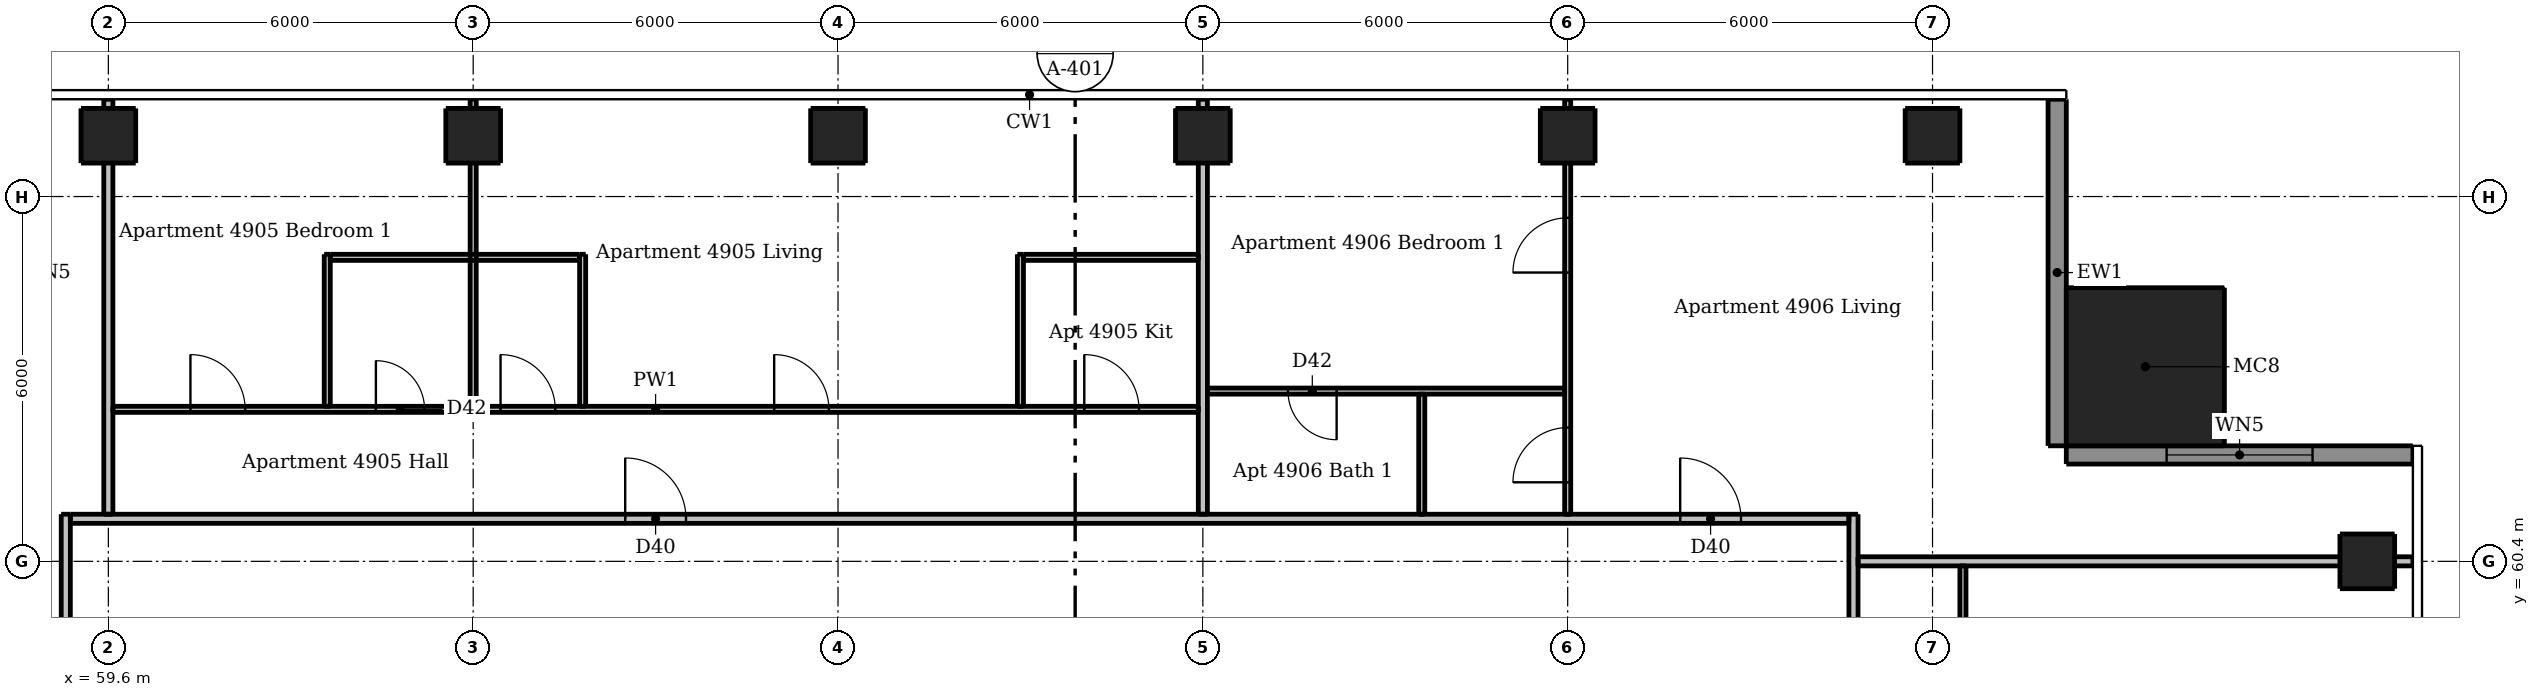
"""IFC4 building model, lengths in metres.
Left out: names, types, materials, properties, quantities, classifications, styles, units other than length and angle.
Written with IfcOpenShell. Run it as: python <this file> out.ifc"""

import sys

from ifc_helpers import new_model, si_unit, direction, frame, frame_2d, origin, origin_2d, place, context, subcontext, project, spatial, rectangle, extrude, element, fill, save


model = new_model("IFC4")
c1 = context("Model", 3, precision=1e-05, world=origin(), true_north=direction((0.0, 1.0)))
c2 = subcontext(c1, "Body", "Model", "MODEL_VIEW")
j1 = project(units=[si_unit("LENGTHUNIT", "METRE"), si_unit("PLANEANGLEUNIT", "RADIAN")], contexts=[c1])
p1 = place(None, origin())
s1 = spatial("IfcSite", under=j1, at=p1, CompositionType="ELEMENT")
p2 = place(p1, origin())
s2 = spatial("IfcBuilding", under=s1, at=p2, CompositionType="ELEMENT")
p3 = place(p2, frame((0.0, 0.0, 187.0)))
s3 = spatial("IfcBuildingStorey", under=s2, at=p3, CompositionType="ELEMENT", Elevation=187.0)
for number, where, z_axis, x_axis in (
    (1, (96.75, 60.4, 0.0), (0.0, 0.0, 1.0), (1.0, 0.0, 0.0)),
    (2, (59.6, 67.4, 0.0), (0.0, 0.0, 1.0), (1.0, 0.0, 0.0)),
    (3, (65.6, 67.4, 0.0), (0.0, 0.0, 1.0), (1.0, 0.0, 0.0)),
    (4, (71.6, 67.4, 0.0), (0.0, 0.0, 1.0), (1.0, 0.0, 0.0)),
    (5, (77.6, 67.4, 0.0), (0.0, 0.0, 1.0), (1.0, 0.0, 0.0)),
    (6, (83.6, 67.4, 0.0), (0.0, 0.0, 1.0), (1.0, 0.0, 0.0)),
    (7, (89.6, 67.4, 0.0), (0.0, 0.0, 1.0), (1.0, 0.0, 0.0)),
):
    element("IfcColumn", number, at=place(p3, frame(where, z_axis=z_axis, x_axis=x_axis)), inside=s3, PredefinedType="COLUMN", context=c2, shape_type="SweptSolid", body=[
        extrude(rectangle(XDim=0.9, YDim=0.9, at=origin_2d()), origin(), (0.0, 0.0, 1.0), 3.05),
    ])
p4 = place(p3, frame((93.1, 63.6, 0.0), z_axis=(0.0, 0.0, 1.0), x_axis=(1.0, 0.0, 0.0)))
e8 = element("IfcColumn", 8, at=p4, inside=s3, PredefinedType="COLUMN", context=c2, shape_type="SweptSolid", body=[
    extrude(rectangle(XDim=2.6, YDim=2.6, at=origin_2d()), origin(), (0.0, 0.0, 1.0), 3.3),
])
p5 = place(p3, frame((97.5, 62.15, 0.0), z_axis=(0.0, 0.0, 1.0), x_axis=(-1.0, 0.0, 0.0)))
e9 = element("IfcWall", 9, at=p5, inside=s3, PredefinedType="SOLIDWALL", context=c2, shape_type="SweptSolid", body=[
    extrude(rectangle(XDim=5.7, YDim=0.3, at=frame_2d((2.85, 0.0))), origin(), (0.0, 0.0, 1.0), 3.05),
])
p6 = place(p5, frame((1.65, 0.0, 0.15)))
e10 = element("IfcOpeningElement", 10, at=p6, cuts=e9, PredefinedType="OPENING", context=c2, shape_type="SweptSolid", body=[
    extrude(rectangle(XDim=2.4, YDim=2.1, at=frame_2d((1.2, 1.05))), frame((0.0, 0.16, 0.0), z_axis=(0.0, -1.0, 0.0), x_axis=(1.0, 0.0, 0.0)), (0.0, 0.0, 1.0), 0.32),
])
p7 = place(p3, frame((91.65, 62.3, 0.0), z_axis=(0.0, 0.0, 1.0), x_axis=(0.0, 1.0, 0.0)))
e11 = element("IfcWall", 11, at=p7, inside=s3, PredefinedType="SOLIDWALL", context=c2, shape_type="SweptSolid", body=[
    extrude(rectangle(XDim=5.7, YDim=0.3, at=frame_2d((2.85, 0.0))), origin(), (0.0, 0.0, 1.0), 3.05),
])
p8 = place(p3, frame((63.2, 62.95, 0.0), z_axis=(0.0, 0.0, 1.0), x_axis=(0.0, 1.0, 0.0)))
e12 = element("IfcWall", 12, at=p8, inside=s3, PredefinedType="PARTITIONING", context=c2, shape_type="SweptSolid", body=[
    extrude(rectangle(XDim=2.5, YDim=0.1, at=frame_2d((1.25, 0.0))), origin(), (0.0, 0.0, 1.0), 3.05),
])
p9 = place(p3, frame((65.6, 62.95, 0.0), z_axis=(0.0, 0.0, 1.0), x_axis=(0.0, 1.0, 0.0)))
e13 = element("IfcWall", 13, at=p9, inside=s3, PredefinedType="PARTITIONING", context=c2, shape_type="SweptSolid", body=[
    extrude(rectangle(XDim=5.05, YDim=0.1, at=frame_2d((2.525, 0.0))), origin(), (0.0, 0.0, 1.0), 2.516),
])
for number, where, z_axis, x_axis in (
    (14, (67.4, 62.95, 0.0), (0.0, 0.0, 1.0), (0.0, 1.0, 0.0)),
    (15, (74.6, 62.95, 0.0), (0.0, 0.0, 1.0), (0.0, 1.0, 0.0)),
):
    element("IfcWall", number, at=place(p3, frame(where, z_axis=z_axis, x_axis=x_axis)), inside=s3, PredefinedType="PARTITIONING", context=c2, shape_type="SweptSolid", body=[
        extrude(rectangle(XDim=2.5, YDim=0.1, at=frame_2d((1.25, 0.0))), origin(), (0.0, 0.0, 1.0), 3.05),
    ])
p10 = place(p3, frame((81.2, 61.175, 0.0), z_axis=(0.0, 0.0, 1.0), x_axis=(0.0, 1.0, 0.0)))
e16 = element("IfcWall", 16, at=p10, inside=s3, PredefinedType="PARTITIONING", context=c2, shape_type="SweptSolid", body=[
    extrude(rectangle(XDim=1.975, YDim=0.1, at=frame_2d((0.987, 0.0))), origin(), (0.0, 0.0, 1.0), 3.05),
])
p11 = place(p3, frame((83.6, 61.175, 0.0), z_axis=(0.0, 0.0, 1.0), x_axis=(0.0, 1.0, 0.0)))
e17 = element("IfcWall", 17, at=p11, inside=s3, PredefinedType="PARTITIONING", context=c2, shape_type="SweptSolid", body=[
    extrude(rectangle(XDim=6.825, YDim=0.1, at=frame_2d((3.413, 0.0))), origin(), (0.0, 0.0, 1.0), 2.516),
])
p12 = place(p11, frame((0.525, 0.0, 0.0)))
e18 = element("IfcOpeningElement", 18, at=p12, cuts=e17, PredefinedType="OPENING", context=c2, shape_type="SweptSolid", body=[
    extrude(rectangle(XDim=0.9, YDim=2.1, at=frame_2d((0.45, 1.05))), frame((0.0, 0.06, 0.0), z_axis=(0.0, -1.0, 0.0), x_axis=(1.0, 0.0, 0.0)), (0.0, 0.0, 1.0), 0.12),
])
p13 = place(p11, frame((3.975, 0.0, 0.0)))
e19 = element("IfcOpeningElement", 19, at=p13, cuts=e17, PredefinedType="OPENING", context=c2, shape_type="SweptSolid", body=[
    extrude(rectangle(XDim=0.9, YDim=2.1, at=frame_2d((0.45, 1.05))), frame((0.0, 0.06, 0.0), z_axis=(0.0, -1.0, 0.0), x_axis=(1.0, 0.0, 0.0)), (0.0, 0.0, 1.0), 0.12),
])
p14 = place(p3, frame((90.1, 60.325, 0.0), z_axis=(0.0, 0.0, 1.0), x_axis=(0.0, -1.0, 0.0)))
e20 = element("IfcWall", 20, at=p14, inside=s3, PredefinedType="PARTITIONING", context=c2, shape_type="SweptSolid", body=[
    extrude(rectangle(XDim=20.75, YDim=0.1, at=frame_2d((10.375, 0.0))), origin(), (0.0, 0.0, 1.0), 3.05),
])
p15 = place(p14, frame((17.425, 0.0, 0.0)))
e21 = element("IfcOpeningElement", 21, at=p15, cuts=e20, PredefinedType="OPENING", context=c2, shape_type="SweptSolid", body=[
    extrude(rectangle(XDim=0.9, YDim=2.1, at=frame_2d((0.45, 1.05))), frame((0.0, 0.06, 0.0), z_axis=(0.0, -1.0, 0.0), x_axis=(1.0, 0.0, 0.0)), (0.0, 0.0, 1.0), 0.12),
])
p16 = place(p14, frame((12.975, 0.0, 0.0)))
e22 = element("IfcOpeningElement", 22, at=p16, cuts=e20, PredefinedType="OPENING", context=c2, shape_type="SweptSolid", body=[
    extrude(rectangle(XDim=0.9, YDim=2.1, at=frame_2d((0.45, 1.05))), frame((0.0, 0.06, 0.0), z_axis=(0.0, -1.0, 0.0), x_axis=(1.0, 0.0, 0.0)), (0.0, 0.0, 1.0), 0.12),
])
p17 = place(p14, frame((7.275, 0.0, 0.0)))
e23 = element("IfcOpeningElement", 23, at=p17, cuts=e20, PredefinedType="OPENING", context=c2, shape_type="SweptSolid", body=[
    extrude(rectangle(XDim=0.9, YDim=2.1, at=frame_2d((0.45, 1.05))), frame((0.0, 0.06, 0.0), z_axis=(0.0, -1.0, 0.0), x_axis=(1.0, 0.0, 0.0)), (0.0, 0.0, 1.0), 0.12),
])
p18 = place(p14, frame((1.275, 0.0, 0.0)))
e24 = element("IfcOpeningElement", 24, at=p18, cuts=e20, PredefinedType="OPENING", context=c2, shape_type="SweptSolid", body=[
    extrude(rectangle(XDim=0.9, YDim=2.1, at=frame_2d((0.45, 1.05))), frame((0.0, 0.06, 0.0), z_axis=(0.0, -1.0, 0.0), x_axis=(1.0, 0.0, 0.0)), (0.0, 0.0, 1.0), 0.12),
])
p19 = place(p14, frame((10.325, 0.0, 0.0)))
e25 = element("IfcOpeningElement", 25, at=p19, cuts=e20, PredefinedType="OPENING", context=c2, shape_type="SweptSolid", body=[
    extrude(rectangle(XDim=0.8, YDim=2.1, at=frame_2d((0.4, 1.05))), frame((0.0, 0.06, 0.0), z_axis=(0.0, -1.0, 0.0), x_axis=(1.0, 0.0, 0.0)), (0.0, 0.0, 1.0), 0.12),
])
p20 = place(p14, frame((4.325, 0.0, 0.0)))
e26 = element("IfcOpeningElement", 26, at=p20, cuts=e20, PredefinedType="OPENING", context=c2, shape_type="SweptSolid", body=[
    extrude(rectangle(XDim=0.8, YDim=2.1, at=frame_2d((0.4, 1.05))), frame((0.0, 0.06, 0.0), z_axis=(0.0, -1.0, 0.0), x_axis=(1.0, 0.0, 0.0)), (0.0, 0.0, 1.0), 0.12),
])
p21 = place(p3, frame((63.25, 65.4, 0.0), z_axis=(0.0, 0.0, 1.0), x_axis=(1.0, 0.0, 0.0)))
e27 = element("IfcWall", 27, at=p21, inside=s3, PredefinedType="PARTITIONING", context=c2, shape_type="SweptSolid", body=[
    extrude(rectangle(XDim=4.1, YDim=0.1, at=frame_2d((2.05, 0.0))), origin(), (0.0, 0.0, 1.0), 3.05),
])
p22 = place(p3, frame((74.65, 65.4, 0.0), z_axis=(0.0, 0.0, 1.0), x_axis=(1.0, 0.0, 0.0)))
e28 = element("IfcWall", 28, at=p22, inside=s3, PredefinedType="PARTITIONING", context=c2, shape_type="SweptSolid", body=[
    extrude(rectangle(XDim=2.875, YDim=0.1, at=frame_2d((1.438, 0.0))), origin(), (0.0, 0.0, 1.0), 3.05),
])
p23 = place(p3, frame((83.55, 63.2, 0.0), z_axis=(0.0, 0.0, 1.0), x_axis=(-1.0, 0.0, 0.0)))
e29 = element("IfcWall", 29, at=p23, inside=s3, PredefinedType="PARTITIONING", context=c2, shape_type="SweptSolid", body=[
    extrude(rectangle(XDim=5.875, YDim=0.1, at=frame_2d((2.938, 0.0))), origin(), (0.0, 0.0, 1.0), 3.05),
])
p24 = place(p23, frame((3.75, 0.0, 0.0)))
e30 = element("IfcOpeningElement", 30, at=p24, cuts=e29, PredefinedType="OPENING", context=c2, shape_type="SweptSolid", body=[
    extrude(rectangle(XDim=0.8, YDim=2.1, at=frame_2d((0.4, 1.05))), frame((0.0, 0.06, 0.0), z_axis=(0.0, -1.0, 0.0), x_axis=(1.0, 0.0, 0.0)), (0.0, 0.0, 1.0), 0.12),
])
p25 = place(p3, frame((59.675, 62.9, 0.0), z_axis=(0.0, 0.0, 1.0), x_axis=(1.0, 0.0, 0.0)))
e31 = element("IfcWall", 31, at=p25, inside=s3, PredefinedType="PARTITIONING", context=c2, shape_type="SweptSolid", body=[
    extrude(rectangle(XDim=17.85, YDim=0.1, at=frame_2d((8.925, 0.0))), origin(), (0.0, 0.0, 1.0), 3.05),
])
p26 = place(p25, frame((10.875, 0.0, 0.0)))
e32 = element("IfcOpeningElement", 32, at=p26, cuts=e31, PredefinedType="OPENING", context=c2, shape_type="SweptSolid", body=[
    extrude(rectangle(XDim=0.9, YDim=2.1, at=frame_2d((0.45, 1.05))), frame((0.0, 0.06, 0.0), z_axis=(0.0, -1.0, 0.0), x_axis=(1.0, 0.0, 0.0)), (0.0, 0.0, 1.0), 0.12),
])
p27 = place(p25, frame((15.975, 0.0, 0.0)))
e33 = element("IfcOpeningElement", 33, at=p27, cuts=e31, PredefinedType="OPENING", context=c2, shape_type="SweptSolid", body=[
    extrude(rectangle(XDim=0.9, YDim=2.1, at=frame_2d((0.45, 1.05))), frame((0.0, 0.06, 0.0), z_axis=(0.0, -1.0, 0.0), x_axis=(1.0, 0.0, 0.0)), (0.0, 0.0, 1.0), 0.12),
])
p28 = place(p25, frame((6.375, 0.0, 0.0)))
e34 = element("IfcOpeningElement", 34, at=p28, cuts=e31, PredefinedType="OPENING", context=c2, shape_type="SweptSolid", body=[
    extrude(rectangle(XDim=0.9, YDim=2.1, at=frame_2d((0.45, 1.05))), frame((0.0, 0.06, 0.0), z_axis=(0.0, -1.0, 0.0), x_axis=(1.0, 0.0, 0.0)), (0.0, 0.0, 1.0), 0.12),
])
p29 = place(p25, frame((1.275, 0.0, 0.0)))
e35 = element("IfcOpeningElement", 35, at=p29, cuts=e31, PredefinedType="OPENING", context=c2, shape_type="SweptSolid", body=[
    extrude(rectangle(XDim=0.9, YDim=2.1, at=frame_2d((0.45, 1.05))), frame((0.0, 0.06, 0.0), z_axis=(0.0, -1.0, 0.0), x_axis=(1.0, 0.0, 0.0)), (0.0, 0.0, 1.0), 0.12),
])
p30 = place(p25, frame((4.325, 0.0, 0.0)))
e36 = element("IfcOpeningElement", 36, at=p30, cuts=e31, PredefinedType="OPENING", context=c2, shape_type="SweptSolid", body=[
    extrude(rectangle(XDim=0.8, YDim=2.1, at=frame_2d((0.4, 1.05))), frame((0.0, 0.06, 0.0), z_axis=(0.0, -1.0, 0.0), x_axis=(1.0, 0.0, 0.0)), (0.0, 0.0, 1.0), 0.12),
])
p31 = place(p3, frame((58.9, 30.325, 0.0), z_axis=(0.0, 0.0, 1.0), x_axis=(0.0, 1.0, 0.0)))
e37 = element("IfcWall", 37, at=p31, inside=s3, PredefinedType="PARTITIONING", context=c2, shape_type="SweptSolid", body=[
    extrude(rectangle(XDim=30.85, YDim=0.15, at=frame_2d((15.425, 0.0))), origin(), (0.0, 0.0, 1.0), 3.05),
])
p32 = place(p31, frame((9.225, 0.0, 0.0)))
e38 = element("IfcOpeningElement", 38, at=p32, cuts=e37, PredefinedType="OPENING", context=c2, shape_type="SweptSolid", body=[
    extrude(rectangle(XDim=1.0, YDim=2.1, at=frame_2d((0.5, 1.05))), frame((0.0, 0.085, 0.0), z_axis=(0.0, -1.0, 0.0), x_axis=(1.0, 0.0, 0.0)), (0.0, 0.0, 1.0), 0.17),
])
p33 = place(p31, frame((26.925, 0.0, 0.0)))
e39 = element("IfcOpeningElement", 39, at=p33, cuts=e37, PredefinedType="OPENING", context=c2, shape_type="SweptSolid", body=[
    extrude(rectangle(XDim=1.0, YDim=2.1, at=frame_2d((0.5, 1.05))), frame((0.0, 0.085, 0.0), z_axis=(0.0, -1.0, 0.0), x_axis=(1.0, 0.0, 0.0)), (0.0, 0.0, 1.0), 0.17),
])
p34 = place(p3, frame((59.6, 61.175, 0.0), z_axis=(0.0, 0.0, 1.0), x_axis=(0.0, 1.0, 0.0)))
e40 = element("IfcWall", 40, at=p34, inside=s3, PredefinedType="PARTITIONING", context=c2, shape_type="SweptSolid", body=[
    extrude(rectangle(XDim=6.825, YDim=0.15, at=frame_2d((3.413, 0.0))), origin(), (0.0, 0.0, 1.0), 2.51),
])
p35 = place(p3, frame((77.6, 61.175, 0.0), z_axis=(0.0, 0.0, 1.0), x_axis=(0.0, 1.0, 0.0)))
e41 = element("IfcWall", 41, at=p35, inside=s3, PredefinedType="PARTITIONING", context=c2, shape_type="SweptSolid", body=[
    extrude(rectangle(XDim=6.825, YDim=0.15, at=frame_2d((3.413, 0.0))), origin(), (0.0, 0.0, 1.0), 2.516),
])
p36 = place(p3, frame((88.3, 61.175, 0.0), z_axis=(0.0, 0.0, 1.0), x_axis=(0.0, -1.0, 0.0)))
e42 = element("IfcWall", 42, at=p36, inside=s3, PredefinedType="PARTITIONING", context=c2, shape_type="SweptSolid", body=[
    extrude(rectangle(XDim=29.4, YDim=0.15, at=frame_2d((14.7, 0.0))), origin(), (0.0, 0.0, 1.0), 3.05),
])
p37 = place(p36, frame((28.125, 0.0, 0.0)))
e43 = element("IfcOpeningElement", 43, at=p37, cuts=e42, PredefinedType="OPENING", context=c2, shape_type="SweptSolid", body=[
    extrude(rectangle(XDim=1.0, YDim=2.1, at=frame_2d((0.5, 1.05))), frame((0.0, 0.085, 0.0), z_axis=(0.0, -1.0, 0.0), x_axis=(1.0, 0.0, 0.0)), (0.0, 0.0, 1.0), 0.17),
])
p38 = place(p36, frame((10.725, 0.0, 0.0)))
e44 = element("IfcOpeningElement", 44, at=p38, cuts=e42, PredefinedType="OPENING", context=c2, shape_type="SweptSolid", body=[
    extrude(rectangle(XDim=1.0, YDim=2.1, at=frame_2d((0.5, 1.05))), frame((0.0, 0.085, 0.0), z_axis=(0.0, -1.0, 0.0), x_axis=(1.0, 0.0, 0.0)), (0.0, 0.0, 1.0), 0.17),
])
p39 = place(p3, frame((58.975, 61.1, 0.0), z_axis=(0.0, 0.0, 1.0), x_axis=(1.0, 0.0, 0.0)))
e45 = element("IfcWall", 45, at=p39, inside=s3, PredefinedType="PARTITIONING", context=c2, shape_type="SweptSolid", body=[
    extrude(rectangle(XDim=29.25, YDim=0.15, at=frame_2d((14.625, 0.0))), origin(), (0.0, 0.0, 1.0), 3.05),
])
p40 = place(p39, frame((9.125, 0.0, 0.0)))
e46 = element("IfcOpeningElement", 46, at=p40, cuts=e45, PredefinedType="OPENING", context=c2, shape_type="SweptSolid", body=[
    extrude(rectangle(XDim=1.0, YDim=2.1, at=frame_2d((0.5, 1.05))), frame((0.0, 0.085, 0.0), z_axis=(0.0, -1.0, 0.0), x_axis=(1.0, 0.0, 0.0)), (0.0, 0.0, 1.0), 0.17),
])
p41 = place(p39, frame((26.475, 0.0, 0.0)))
e47 = element("IfcOpeningElement", 47, at=p41, cuts=e45, PredefinedType="OPENING", context=c2, shape_type="SweptSolid", body=[
    extrude(rectangle(XDim=1.0, YDim=2.1, at=frame_2d((0.5, 1.05))), frame((0.0, 0.085, 0.0), z_axis=(0.0, -1.0, 0.0), x_axis=(1.0, 0.0, 0.0)), (0.0, 0.0, 1.0), 0.17),
])
p42 = place(p3, frame((88.375, 60.4, 0.0), z_axis=(0.0, 0.0, 1.0), x_axis=(1.0, 0.0, 0.0)))
e48 = element("IfcWall", 48, at=p42, inside=s3, PredefinedType="PARTITIONING", context=c2, shape_type="SweptSolid", body=[
    extrude(rectangle(XDim=9.125, YDim=0.15, at=frame_2d((4.562, 0.0))), origin(), (0.0, 0.0, 1.0), 2.59),
])
p43 = place(p6, origin())
e49 = element("IfcWindow", 49, at=p43, inside=s3, PartitioningType="DOUBLE_PANEL_VERTICAL", PredefinedType="WINDOW", context=c2, shape_type="SweptSolid", body=[
    extrude(rectangle(XDim=2.4, YDim=2.1, at=frame_2d((1.2, 1.05))), frame((0.0, 0.03, 0.0), z_axis=(0.0, -1.0, 0.0), x_axis=(1.0, 0.0, 0.0)), (0.0, 0.0, 1.0), 0.06),
])
fill(e10, e49)
p44 = place(p40, origin())
e50 = element("IfcDoor", 50, at=p44, inside=s3, OperationType="SINGLE_SWING_LEFT", PredefinedType="DOOR", context=c2, shape_type="SweptSolid", body=[
    extrude(rectangle(XDim=1.0, YDim=2.1, at=frame_2d((0.5, 1.05))), frame((0.0, 0.025, 0.0), z_axis=(0.0, -1.0, 0.0), x_axis=(1.0, 0.0, 0.0)), (0.0, 0.0, 1.0), 0.05),
])
fill(e46, e50)
p45 = place(p26, origin())
e51 = element("IfcDoor", 51, at=p45, inside=s3, OperationType="SINGLE_SWING_LEFT", PredefinedType="DOOR", context=c2, shape_type="SweptSolid", body=[
    extrude(rectangle(XDim=0.9, YDim=2.1, at=frame_2d((0.45, 1.05))), frame((0.0, 0.025, 0.0), z_axis=(0.0, -1.0, 0.0), x_axis=(1.0, 0.0, 0.0)), (0.0, 0.0, 1.0), 0.05),
])
fill(e32, e51)
p46 = place(p27, origin())
e52 = element("IfcDoor", 52, at=p46, inside=s3, OperationType="SINGLE_SWING_LEFT", PredefinedType="DOOR", context=c2, shape_type="SweptSolid", body=[
    extrude(rectangle(XDim=0.9, YDim=2.1, at=frame_2d((0.45, 1.05))), frame((0.0, 0.025, 0.0), z_axis=(0.0, -1.0, 0.0), x_axis=(1.0, 0.0, 0.0)), (0.0, 0.0, 1.0), 0.05),
])
fill(e33, e52)
p47 = place(p28, origin())
e53 = element("IfcDoor", 53, at=p47, inside=s3, OperationType="SINGLE_SWING_LEFT", PredefinedType="DOOR", context=c2, shape_type="SweptSolid", body=[
    extrude(rectangle(XDim=0.9, YDim=2.1, at=frame_2d((0.45, 1.05))), frame((0.0, 0.025, 0.0), z_axis=(0.0, -1.0, 0.0), x_axis=(1.0, 0.0, 0.0)), (0.0, 0.0, 1.0), 0.05),
])
fill(e34, e53)
p48 = place(p29, origin())
e54 = element("IfcDoor", 54, at=p48, inside=s3, OperationType="SINGLE_SWING_LEFT", PredefinedType="DOOR", context=c2, shape_type="SweptSolid", body=[
    extrude(rectangle(XDim=0.9, YDim=2.1, at=frame_2d((0.45, 1.05))), frame((0.0, 0.025, 0.0), z_axis=(0.0, -1.0, 0.0), x_axis=(1.0, 0.0, 0.0)), (0.0, 0.0, 1.0), 0.05),
])
fill(e35, e54)
p49 = place(p30, origin())
e55 = element("IfcDoor", 55, at=p49, inside=s3, OperationType="SINGLE_SWING_LEFT", PredefinedType="DOOR", context=c2, shape_type="SweptSolid", body=[
    extrude(rectangle(XDim=0.8, YDim=2.1, at=frame_2d((0.4, 1.05))), frame((0.0, 0.025, 0.0), z_axis=(0.0, -1.0, 0.0), x_axis=(1.0, 0.0, 0.0)), (0.0, 0.0, 1.0), 0.05),
])
fill(e36, e55)
p50 = place(p41, origin())
e56 = element("IfcDoor", 56, at=p50, inside=s3, OperationType="SINGLE_SWING_LEFT", PredefinedType="DOOR", context=c2, shape_type="SweptSolid", body=[
    extrude(rectangle(XDim=1.0, YDim=2.1, at=frame_2d((0.5, 1.05))), frame((0.0, 0.025, 0.0), z_axis=(0.0, -1.0, 0.0), x_axis=(1.0, 0.0, 0.0)), (0.0, 0.0, 1.0), 0.05),
])
fill(e47, e56)
p51 = place(p12, origin())
e57 = element("IfcDoor", 57, at=p51, inside=s3, OperationType="SINGLE_SWING_LEFT", PredefinedType="DOOR", context=c2, shape_type="SweptSolid", body=[
    extrude(rectangle(XDim=0.9, YDim=2.1, at=frame_2d((0.45, 1.05))), frame((0.0, 0.025, 0.0), z_axis=(0.0, -1.0, 0.0), x_axis=(1.0, 0.0, 0.0)), (0.0, 0.0, 1.0), 0.05),
])
fill(e18, e57)
p52 = place(p13, origin())
e58 = element("IfcDoor", 58, at=p52, inside=s3, OperationType="SINGLE_SWING_LEFT", PredefinedType="DOOR", context=c2, shape_type="SweptSolid", body=[
    extrude(rectangle(XDim=0.9, YDim=2.1, at=frame_2d((0.45, 1.05))), frame((0.0, 0.025, 0.0), z_axis=(0.0, -1.0, 0.0), x_axis=(1.0, 0.0, 0.0)), (0.0, 0.0, 1.0), 0.05),
])
fill(e19, e58)
p53 = place(p24, origin())
e59 = element("IfcDoor", 59, at=p53, inside=s3, OperationType="SINGLE_SWING_LEFT", PredefinedType="DOOR", context=c2, shape_type="SweptSolid", body=[
    extrude(rectangle(XDim=0.8, YDim=2.1, at=frame_2d((0.4, 1.05))), frame((0.0, 0.025, 0.0), z_axis=(0.0, -1.0, 0.0), x_axis=(1.0, 0.0, 0.0)), (0.0, 0.0, 1.0), 0.05),
])
fill(e30, e59)
save(model, sys.argv[1])
